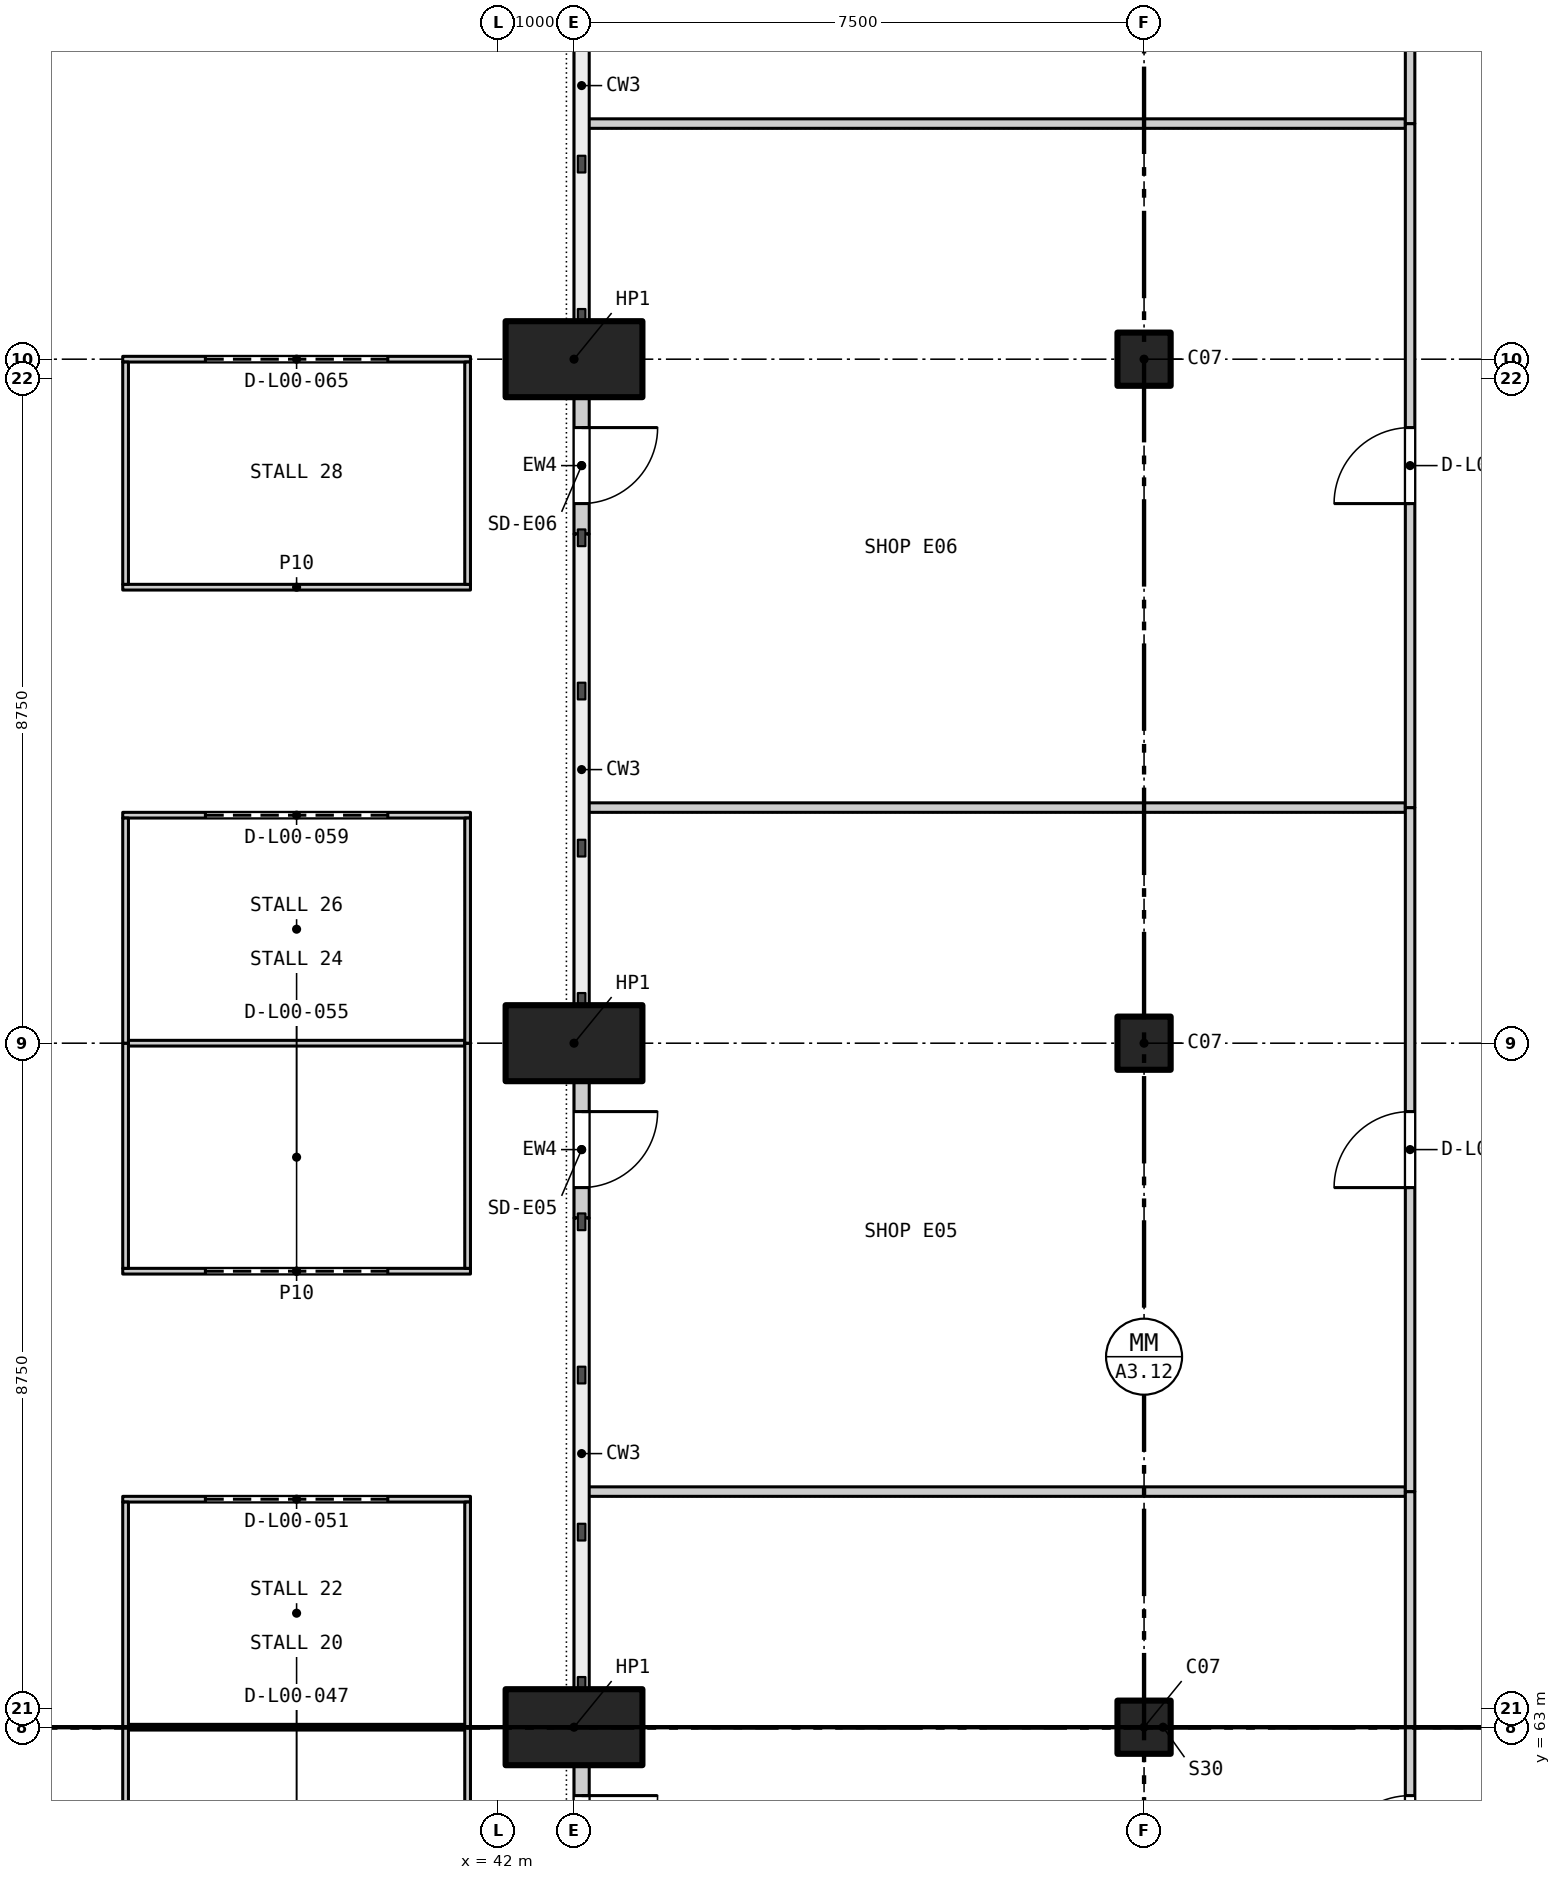
"""IFC4 building model, lengths in metres.
Left out: names, types, materials, properties, quantities, classifications, styles, units other than length and angle.
Written with IfcOpenShell. Run it as: python <this file> out.ifc"""

import sys

from ifc_helpers import new_model, si_unit, direction, frame, frame_2d, origin, origin_2d, place, context, subcontext, project, spatial, rectangle, extrude, element, fill, save


model = new_model("IFC4")
c1 = context("Model", 3, precision=1e-05, world=origin(), true_north=direction((0.0, 1.0)))
c2 = subcontext(c1, "Body", "Model", "MODEL_VIEW")
j1 = project(units=[si_unit("LENGTHUNIT", "METRE"), si_unit("PLANEANGLEUNIT", "RADIAN")], contexts=[c1])
p1 = place(None, origin())
s1 = spatial("IfcSite", under=j1, at=p1, CompositionType="ELEMENT")
p2 = place(p1, origin())
s2 = spatial("IfcBuilding", under=s1, at=p2, CompositionType="ELEMENT")
p3 = place(p2, origin())
s3 = spatial("IfcBuildingStorey", under=s2, at=p3, CompositionType="ELEMENT", Elevation=0.0)
for number, where, z_axis, x_axis in (
    (1, (50.5, 63.0, 0.0), (0.0, 0.0, 1.0), (1.0, 0.0, 0.0)),
    (2, (50.5, 72.0, 0.0), (0.0, 0.0, 1.0), (1.0, 0.0, 0.0)),
    (3, (50.5, 81.0, 0.0), (0.0, 0.0, 1.0), (1.0, 0.0, 0.0)),
):
    element("IfcColumn", number, at=place(p3, frame(where, z_axis=z_axis, x_axis=x_axis)), inside=s3, PredefinedType="COLUMN", context=c2, shape_type="SweptSolid", body=[
        extrude(rectangle(XDim=0.7, YDim=0.7, at=origin_2d()), origin(), (0.0, 0.0, 1.0), 6.0),
    ])
for number, where, z_axis, x_axis in (
    (4, (43.0, 63.0, 0.0), (0.0, 0.0, 1.0), (1.0, 0.0, 0.0)),
    (5, (43.0, 72.0, 0.0), (0.0, 0.0, 1.0), (1.0, 0.0, 0.0)),
    (6, (43.0, 81.0, 0.0), (0.0, 0.0, 1.0), (1.0, 0.0, 0.0)),
):
    element("IfcColumn", number, at=place(p3, frame(where, z_axis=z_axis, x_axis=x_axis)), inside=s3, PredefinedType="COLUMN", context=c2, shape_type="SweptSolid", body=[
        extrude(rectangle(XDim=1.8, YDim=1.0, at=origin_2d()), origin(), (0.0, 0.0, 1.0), 6.0),
    ])
p4 = place(p3, frame((43.1, 60.7, 0.0), z_axis=(0.0, 0.0, 1.0), x_axis=(0.0, 1.0, 0.0)))
e7 = element("IfcWall", 7, at=p4, inside=s3, PredefinedType="PARTITIONING", context=c2, shape_type="SweptSolid", body=[
    extrude(rectangle(XDim=1.8, YDim=0.2, at=frame_2d((0.9, 0.0))), origin(), (0.0, 0.0, 1.0), 5.8),
])
p5 = place(p4, frame((0.4, 0.0, 0.0)))
e8 = element("IfcOpeningElement", 8, at=p5, cuts=e7, PredefinedType="OPENING", context=c2, shape_type="SweptSolid", body=[
    extrude(rectangle(XDim=1.0, YDim=2.4, at=frame_2d((0.5, 1.2))), frame((0.0, 0.11, 0.0), z_axis=(0.0, -1.0, 0.0), x_axis=(1.0, 0.0, 0.0)), (0.0, 0.0, 1.0), 0.22),
])
p6 = place(p3, frame((43.1, 69.7, 0.0), z_axis=(0.0, 0.0, 1.0), x_axis=(0.0, 1.0, 0.0)))
e9 = element("IfcWall", 9, at=p6, inside=s3, PredefinedType="PARTITIONING", context=c2, shape_type="SweptSolid", body=[
    extrude(rectangle(XDim=1.8, YDim=0.2, at=frame_2d((0.9, 0.0))), origin(), (0.0, 0.0, 1.0), 5.8),
])
p7 = place(p6, frame((0.4, 0.0, 0.0)))
e10 = element("IfcOpeningElement", 10, at=p7, cuts=e9, PredefinedType="OPENING", context=c2, shape_type="SweptSolid", body=[
    extrude(rectangle(XDim=1.0, YDim=2.4, at=frame_2d((0.5, 1.2))), frame((0.0, 0.11, 0.0), z_axis=(0.0, -1.0, 0.0), x_axis=(1.0, 0.0, 0.0)), (0.0, 0.0, 1.0), 0.22),
])
p8 = place(p3, frame((43.1, 78.7, 0.0), z_axis=(0.0, 0.0, 1.0), x_axis=(0.0, 1.0, 0.0)))
e11 = element("IfcWall", 11, at=p8, inside=s3, PredefinedType="PARTITIONING", context=c2, shape_type="SweptSolid", body=[
    extrude(rectangle(XDim=1.8, YDim=0.2, at=frame_2d((0.9, 0.0))), origin(), (0.0, 0.0, 1.0), 5.8),
])
p9 = place(p8, frame((0.4, 0.0, 0.0)))
e12 = element("IfcOpeningElement", 12, at=p9, cuts=e11, PredefinedType="OPENING", context=c2, shape_type="SweptSolid", body=[
    extrude(rectangle(XDim=1.0, YDim=2.4, at=frame_2d((0.5, 1.2))), frame((0.0, 0.11, 0.0), z_axis=(0.0, -1.0, 0.0), x_axis=(1.0, 0.0, 0.0)), (0.0, 0.0, 1.0), 0.22),
])
p10 = place(p3, frame((37.137, 63.0, 0.0), z_axis=(0.0, 0.0, 1.0), x_axis=(1.0, 0.0, 0.0)))
e13 = element("IfcWall", 13, at=p10, inside=s3, PredefinedType="PARTITIONING", context=c2, shape_type="SweptSolid", body=[
    extrude(rectangle(XDim=4.425, YDim=0.075, at=frame_2d((2.212, 0.0))), origin(), (0.0, 0.0, 1.0), 3.0),
])
p11 = place(p3, frame((37.062, 66.0, 0.0), z_axis=(0.0, 0.0, 1.0), x_axis=(1.0, 0.0, 0.0)))
e14 = element("IfcWall", 14, at=p11, inside=s3, PredefinedType="PARTITIONING", context=c2, shape_type="SweptSolid", body=[
    extrude(rectangle(XDim=4.575, YDim=0.075, at=frame_2d((2.288, 0.0))), origin(), (0.0, 0.0, 1.0), 3.0),
])
p12 = place(p11, frame((1.087, 0.0, 0.0)))
e15 = element("IfcOpeningElement", 15, at=p12, cuts=e14, PredefinedType="OPENING", context=c2, shape_type="SweptSolid", body=[
    extrude(rectangle(XDim=2.4, YDim=2.4, at=frame_2d((1.2, 1.2))), frame((0.0, 0.047, 0.0), z_axis=(0.0, -1.0, 0.0), x_axis=(1.0, 0.0, 0.0)), (0.0, 0.0, 1.0), 0.095),
])
p13 = place(p3, frame((43.1, 66.1, 0.0), z_axis=(0.0, 0.0, 1.0), x_axis=(1.0, 0.0, 0.0)))
e16 = element("IfcWall", 16, at=p13, inside=s3, PredefinedType="PARTITIONING", context=c2, shape_type="SweptSolid", body=[
    extrude(rectangle(XDim=10.837, YDim=0.125, at=frame_2d((5.419, 0.0))), origin(), (0.0, 0.0, 1.0), 5.8),
])
p14 = place(p3, frame((37.062, 69.0, 0.0), z_axis=(0.0, 0.0, 1.0), x_axis=(1.0, 0.0, 0.0)))
e17 = element("IfcWall", 17, at=p14, inside=s3, PredefinedType="PARTITIONING", context=c2, shape_type="SweptSolid", body=[
    extrude(rectangle(XDim=4.575, YDim=0.075, at=frame_2d((2.288, 0.0))), origin(), (0.0, 0.0, 1.0), 3.0),
])
p15 = place(p14, frame((1.087, 0.0, 0.0)))
e18 = element("IfcOpeningElement", 18, at=p15, cuts=e17, PredefinedType="OPENING", context=c2, shape_type="SweptSolid", body=[
    extrude(rectangle(XDim=2.4, YDim=2.4, at=frame_2d((1.2, 1.2))), frame((0.0, 0.047, 0.0), z_axis=(0.0, -1.0, 0.0), x_axis=(1.0, 0.0, 0.0)), (0.0, 0.0, 1.0), 0.095),
])
p16 = place(p3, frame((37.137, 72.0, 0.0), z_axis=(0.0, 0.0, 1.0), x_axis=(1.0, 0.0, 0.0)))
e19 = element("IfcWall", 19, at=p16, inside=s3, PredefinedType="PARTITIONING", context=c2, shape_type="SweptSolid", body=[
    extrude(rectangle(XDim=4.425, YDim=0.075, at=frame_2d((2.212, 0.0))), origin(), (0.0, 0.0, 1.0), 3.0),
])
p17 = place(p3, frame((37.062, 75.0, 0.0), z_axis=(0.0, 0.0, 1.0), x_axis=(1.0, 0.0, 0.0)))
e20 = element("IfcWall", 20, at=p17, inside=s3, PredefinedType="PARTITIONING", context=c2, shape_type="SweptSolid", body=[
    extrude(rectangle(XDim=4.575, YDim=0.075, at=frame_2d((2.288, 0.0))), origin(), (0.0, 0.0, 1.0), 3.0),
])
p18 = place(p17, frame((1.087, 0.0, 0.0)))
e21 = element("IfcOpeningElement", 21, at=p18, cuts=e20, PredefinedType="OPENING", context=c2, shape_type="SweptSolid", body=[
    extrude(rectangle(XDim=2.4, YDim=2.4, at=frame_2d((1.2, 1.2))), frame((0.0, 0.047, 0.0), z_axis=(0.0, -1.0, 0.0), x_axis=(1.0, 0.0, 0.0)), (0.0, 0.0, 1.0), 0.095),
])
p19 = place(p3, frame((43.1, 75.1, 0.0), z_axis=(0.0, 0.0, 1.0), x_axis=(1.0, 0.0, 0.0)))
e22 = element("IfcWall", 22, at=p19, inside=s3, PredefinedType="PARTITIONING", context=c2, shape_type="SweptSolid", body=[
    extrude(rectangle(XDim=10.837, YDim=0.125, at=frame_2d((5.419, 0.0))), origin(), (0.0, 0.0, 1.0), 5.8),
])
p20 = place(p3, frame((37.062, 78.0, 0.0), z_axis=(0.0, 0.0, 1.0), x_axis=(1.0, 0.0, 0.0)))
e23 = element("IfcWall", 23, at=p20, inside=s3, PredefinedType="PARTITIONING", context=c2, shape_type="SweptSolid", body=[
    extrude(rectangle(XDim=4.575, YDim=0.075, at=frame_2d((2.288, 0.0))), origin(), (0.0, 0.0, 1.0), 3.0),
])
p21 = place(p3, frame((37.062, 81.0, 0.0), z_axis=(0.0, 0.0, 1.0), x_axis=(1.0, 0.0, 0.0)))
e24 = element("IfcWall", 24, at=p21, inside=s3, PredefinedType="PARTITIONING", context=c2, shape_type="SweptSolid", body=[
    extrude(rectangle(XDim=4.575, YDim=0.075, at=frame_2d((2.288, 0.0))), origin(), (0.0, 0.0, 1.0), 3.0),
])
p22 = place(p21, frame((1.087, 0.0, 0.0)))
e25 = element("IfcOpeningElement", 25, at=p22, cuts=e24, PredefinedType="OPENING", context=c2, shape_type="SweptSolid", body=[
    extrude(rectangle(XDim=2.4, YDim=2.4, at=frame_2d((1.2, 1.2))), frame((0.0, 0.047, 0.0), z_axis=(0.0, -1.0, 0.0), x_axis=(1.0, 0.0, 0.0)), (0.0, 0.0, 1.0), 0.095),
])
p23 = place(p3, frame((43.1, 84.1, 0.0), z_axis=(0.0, 0.0, 1.0), x_axis=(1.0, 0.0, 0.0)))
e26 = element("IfcWall", 26, at=p23, inside=s3, PredefinedType="PARTITIONING", context=c2, shape_type="SweptSolid", body=[
    extrude(rectangle(XDim=10.837, YDim=0.125, at=frame_2d((5.419, 0.0))), origin(), (0.0, 0.0, 1.0), 5.8),
])
for number, where, z_axis, x_axis in (
    (27, (37.1, 60.038, 0.0), (0.0, 0.0, 1.0), (0.0, 1.0, 0.0)),
    (28, (37.1, 63.0, 0.0), (0.0, 0.0, 1.0), (0.0, 1.0, 0.0)),
    (29, (37.1, 69.038, 0.0), (0.0, 0.0, 1.0), (0.0, 1.0, 0.0)),
    (30, (37.1, 72.0, 0.0), (0.0, 0.0, 1.0), (0.0, 1.0, 0.0)),
):
    element("IfcWall", number, at=place(p3, frame(where, z_axis=z_axis, x_axis=x_axis)), inside=s3, PredefinedType="PARTITIONING", context=c2, shape_type="SweptSolid", body=[
        extrude(rectangle(XDim=2.962, YDim=0.075, at=frame_2d((1.481, 0.0))), origin(), (0.0, 0.0, 1.0), 3.0),
    ])
p24 = place(p3, frame((37.1, 78.038, 0.0), z_axis=(0.0, 0.0, 1.0), x_axis=(0.0, 1.0, 0.0)))
e31 = element("IfcWall", 31, at=p24, inside=s3, PredefinedType="PARTITIONING", context=c2, shape_type="SweptSolid", body=[
    extrude(rectangle(XDim=2.925, YDim=0.075, at=frame_2d((1.462, 0.0))), origin(), (0.0, 0.0, 1.0), 3.0),
])
for number, where, z_axis, x_axis in (
    (32, (41.6, 60.038, 0.0), (0.0, 0.0, 1.0), (0.0, 1.0, 0.0)),
    (33, (41.6, 63.0, 0.0), (0.0, 0.0, 1.0), (0.0, 1.0, 0.0)),
    (34, (41.6, 69.038, 0.0), (0.0, 0.0, 1.0), (0.0, 1.0, 0.0)),
    (35, (41.6, 72.0, 0.0), (0.0, 0.0, 1.0), (0.0, 1.0, 0.0)),
):
    element("IfcWall", number, at=place(p3, frame(where, z_axis=z_axis, x_axis=x_axis)), inside=s3, PredefinedType="PARTITIONING", context=c2, shape_type="SweptSolid", body=[
        extrude(rectangle(XDim=2.962, YDim=0.075, at=frame_2d((1.481, 0.0))), origin(), (0.0, 0.0, 1.0), 3.0),
    ])
p25 = place(p3, frame((41.6, 78.038, 0.0), z_axis=(0.0, 0.0, 1.0), x_axis=(0.0, 1.0, 0.0)))
e36 = element("IfcWall", 36, at=p25, inside=s3, PredefinedType="PARTITIONING", context=c2, shape_type="SweptSolid", body=[
    extrude(rectangle(XDim=2.925, YDim=0.075, at=frame_2d((1.462, 0.0))), origin(), (0.0, 0.0, 1.0), 3.0),
])
p26 = place(p3, frame((54.0, 57.1, 0.0), z_axis=(0.0, 0.0, 1.0), x_axis=(0.0, 1.0, 0.0)))
e37 = element("IfcWall", 37, at=p26, inside=s3, PredefinedType="PARTITIONING", context=c2, shape_type="SweptSolid", body=[
    extrude(rectangle(XDim=9.0, YDim=0.125, at=frame_2d((4.5, 0.0))), origin(), (0.0, 0.0, 1.0), 5.05),
])
p27 = place(p26, frame((4.0, 0.0, 0.0)))
e38 = element("IfcOpeningElement", 38, at=p27, cuts=e37, PredefinedType="OPENING", context=c2, shape_type="SweptSolid", body=[
    extrude(rectangle(XDim=1.0, YDim=2.1, at=frame_2d((0.5, 1.05))), frame((0.0, 0.073, 0.0), z_axis=(0.0, -1.0, 0.0), x_axis=(1.0, 0.0, 0.0)), (0.0, 0.0, 1.0), 0.145),
])
p28 = place(p3, frame((54.0, 66.1, 0.0), z_axis=(0.0, 0.0, 1.0), x_axis=(0.0, 1.0, 0.0)))
e39 = element("IfcWall", 39, at=p28, inside=s3, PredefinedType="PARTITIONING", context=c2, shape_type="SweptSolid", body=[
    extrude(rectangle(XDim=9.0, YDim=0.125, at=frame_2d((4.5, 0.0))), origin(), (0.0, 0.0, 1.0), 5.05),
])
p29 = place(p28, frame((4.0, 0.0, 0.0)))
e40 = element("IfcOpeningElement", 40, at=p29, cuts=e39, PredefinedType="OPENING", context=c2, shape_type="SweptSolid", body=[
    extrude(rectangle(XDim=1.0, YDim=2.1, at=frame_2d((0.5, 1.05))), frame((0.0, 0.073, 0.0), z_axis=(0.0, -1.0, 0.0), x_axis=(1.0, 0.0, 0.0)), (0.0, 0.0, 1.0), 0.145),
])
p30 = place(p3, frame((54.0, 75.1, 0.0), z_axis=(0.0, 0.0, 1.0), x_axis=(0.0, 1.0, 0.0)))
e41 = element("IfcWall", 41, at=p30, inside=s3, PredefinedType="PARTITIONING", context=c2, shape_type="SweptSolid", body=[
    extrude(rectangle(XDim=9.0, YDim=0.125, at=frame_2d((4.5, 0.0))), origin(), (0.0, 0.0, 1.0), 5.05),
])
p31 = place(p30, frame((4.0, 0.0, 0.0)))
e42 = element("IfcOpeningElement", 42, at=p31, cuts=e41, PredefinedType="OPENING", context=c2, shape_type="SweptSolid", body=[
    extrude(rectangle(XDim=1.0, YDim=2.1, at=frame_2d((0.5, 1.05))), frame((0.0, 0.073, 0.0), z_axis=(0.0, -1.0, 0.0), x_axis=(1.0, 0.0, 0.0)), (0.0, 0.0, 1.0), 0.145),
])
p32 = place(p3, frame((54.0, 84.1, 0.0), z_axis=(0.0, 0.0, 1.0), x_axis=(0.0, 1.0, 0.0)))
e43 = element("IfcWall", 43, at=p32, inside=s3, PredefinedType="PARTITIONING", context=c2, shape_type="SweptSolid", body=[
    extrude(rectangle(XDim=4.837, YDim=0.125, at=frame_2d((2.419, 0.0))), origin(), (0.0, 0.0, 1.0), 5.05),
])
p33 = place(p5, frame((1.0, 0.0, 0.0), z_axis=(0.0, 0.0, 1.0), x_axis=(-1.0, 0.0, 0.0)))
e44 = element("IfcDoor", 44, at=p33, inside=s3, OperationType="SINGLE_SWING_LEFT", PredefinedType="DOOR", context=c2, shape_type="SweptSolid", body=[
    extrude(rectangle(XDim=1.0, YDim=2.4, at=frame_2d((0.5, 1.2))), frame((0.0, 0.025, 0.0), z_axis=(0.0, -1.0, 0.0), x_axis=(1.0, 0.0, 0.0)), (0.0, 0.0, 1.0), 0.05),
])
fill(e8, e44)
p34 = place(p7, frame((1.0, 0.0, 0.0), z_axis=(0.0, 0.0, 1.0), x_axis=(-1.0, 0.0, 0.0)))
e45 = element("IfcDoor", 45, at=p34, inside=s3, OperationType="SINGLE_SWING_LEFT", PredefinedType="DOOR", context=c2, shape_type="SweptSolid", body=[
    extrude(rectangle(XDim=1.0, YDim=2.4, at=frame_2d((0.5, 1.2))), frame((0.0, 0.025, 0.0), z_axis=(0.0, -1.0, 0.0), x_axis=(1.0, 0.0, 0.0)), (0.0, 0.0, 1.0), 0.05),
])
fill(e10, e45)
p35 = place(p9, frame((1.0, 0.0, 0.0), z_axis=(0.0, 0.0, 1.0), x_axis=(-1.0, 0.0, 0.0)))
e46 = element("IfcDoor", 46, at=p35, inside=s3, OperationType="SINGLE_SWING_LEFT", PredefinedType="DOOR", context=c2, shape_type="SweptSolid", body=[
    extrude(rectangle(XDim=1.0, YDim=2.4, at=frame_2d((0.5, 1.2))), frame((0.0, 0.025, 0.0), z_axis=(0.0, -1.0, 0.0), x_axis=(1.0, 0.0, 0.0)), (0.0, 0.0, 1.0), 0.05),
])
fill(e12, e46)
p36 = place(p27, origin())
e47 = element("IfcDoor", 47, at=p36, inside=s3, OperationType="SINGLE_SWING_LEFT", PredefinedType="DOOR", context=c2, shape_type="SweptSolid", body=[
    extrude(rectangle(XDim=1.0, YDim=2.1, at=frame_2d((0.5, 1.05))), frame((0.0, 0.025, 0.0), z_axis=(0.0, -1.0, 0.0), x_axis=(1.0, 0.0, 0.0)), (0.0, 0.0, 1.0), 0.05),
])
fill(e38, e47)
p37 = place(p12, origin())
e48 = element("IfcDoor", 48, at=p37, inside=s3, OperationType="ROLLINGUP", PredefinedType="DOOR", context=c2, shape_type="SweptSolid", body=[
    extrude(rectangle(XDim=2.4, YDim=2.4, at=frame_2d((1.2, 1.2))), frame((0.0, 0.025, 0.0), z_axis=(0.0, -1.0, 0.0), x_axis=(1.0, 0.0, 0.0)), (0.0, 0.0, 1.0), 0.05),
])
fill(e15, e48)
p38 = place(p15, origin())
e49 = element("IfcDoor", 49, at=p38, inside=s3, OperationType="ROLLINGUP", PredefinedType="DOOR", context=c2, shape_type="SweptSolid", body=[
    extrude(rectangle(XDim=2.4, YDim=2.4, at=frame_2d((1.2, 1.2))), frame((0.0, 0.025, 0.0), z_axis=(0.0, -1.0, 0.0), x_axis=(1.0, 0.0, 0.0)), (0.0, 0.0, 1.0), 0.05),
])
fill(e18, e49)
p39 = place(p29, origin())
e50 = element("IfcDoor", 50, at=p39, inside=s3, OperationType="SINGLE_SWING_LEFT", PredefinedType="DOOR", context=c2, shape_type="SweptSolid", body=[
    extrude(rectangle(XDim=1.0, YDim=2.1, at=frame_2d((0.5, 1.05))), frame((0.0, 0.025, 0.0), z_axis=(0.0, -1.0, 0.0), x_axis=(1.0, 0.0, 0.0)), (0.0, 0.0, 1.0), 0.05),
])
fill(e40, e50)
p40 = place(p18, origin())
e51 = element("IfcDoor", 51, at=p40, inside=s3, OperationType="ROLLINGUP", PredefinedType="DOOR", context=c2, shape_type="SweptSolid", body=[
    extrude(rectangle(XDim=2.4, YDim=2.4, at=frame_2d((1.2, 1.2))), frame((0.0, 0.025, 0.0), z_axis=(0.0, -1.0, 0.0), x_axis=(1.0, 0.0, 0.0)), (0.0, 0.0, 1.0), 0.05),
])
fill(e21, e51)
p41 = place(p31, origin())
e52 = element("IfcDoor", 52, at=p41, inside=s3, OperationType="SINGLE_SWING_LEFT", PredefinedType="DOOR", context=c2, shape_type="SweptSolid", body=[
    extrude(rectangle(XDim=1.0, YDim=2.1, at=frame_2d((0.5, 1.05))), frame((0.0, 0.025, 0.0), z_axis=(0.0, -1.0, 0.0), x_axis=(1.0, 0.0, 0.0)), (0.0, 0.0, 1.0), 0.05),
])
fill(e42, e52)
p42 = place(p22, origin())
e53 = element("IfcDoor", 53, at=p42, inside=s3, OperationType="ROLLINGUP", PredefinedType="DOOR", context=c2, shape_type="SweptSolid", body=[
    extrude(rectangle(XDim=2.4, YDim=2.4, at=frame_2d((1.2, 1.2))), frame((0.0, 0.025, 0.0), z_axis=(0.0, -1.0, 0.0), x_axis=(1.0, 0.0, 0.0)), (0.0, 0.0, 1.0), 0.05),
])
fill(e25, e53)
save(model, sys.argv[1])
